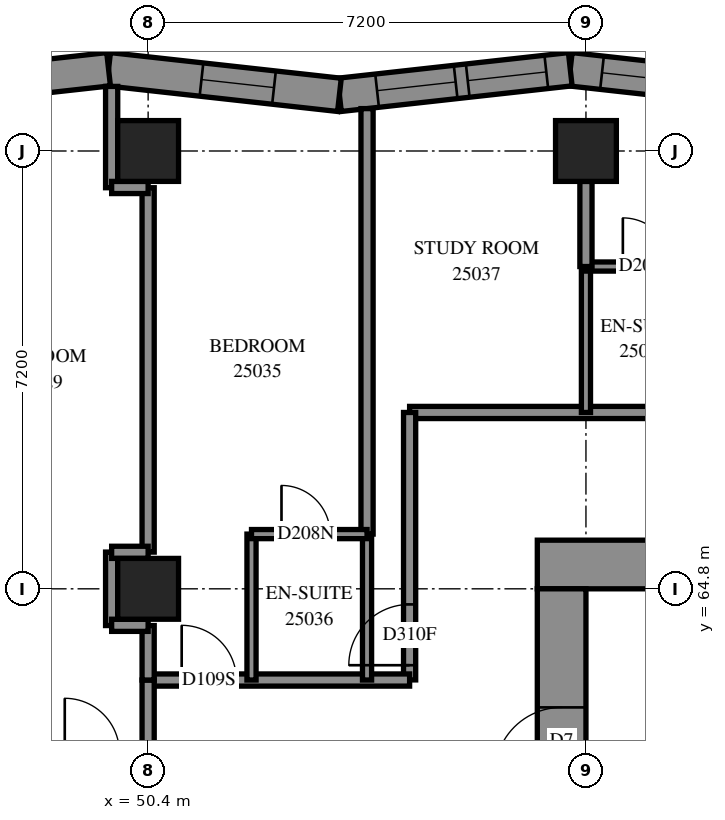
"""IFC4 building model, lengths in metres.
Left out: names, types, materials, properties, quantities, classifications, styles, units other than length and angle.
Written with IfcOpenShell. Run it as: python <this file> out.ifc"""

import sys

from ifc_helpers import new_model, si_unit, direction, frame, frame_2d, origin, origin_2d, place, context, subcontext, project, spatial, polyline, rectangle, outline, extrude, element, fill, save


model = new_model("IFC4")
c1 = context("Model", 3, precision=1e-05, world=origin(), true_north=direction((0.0, 1.0)))
c2 = subcontext(c1, "Body", "Model", "MODEL_VIEW")
j1 = project(units=[si_unit("LENGTHUNIT", "METRE"), si_unit("PLANEANGLEUNIT", "RADIAN")], contexts=[c1])
p1 = place(None, origin())
s1 = spatial("IfcSite", under=j1, at=p1, CompositionType="ELEMENT")
p2 = place(p1, origin())
s2 = spatial("IfcBuilding", under=s1, at=p2, CompositionType="ELEMENT")
p3 = place(p2, frame((0.0, 0.0, 94.8)))
s3 = spatial("IfcBuildingStorey", under=s2, at=p3, CompositionType="ELEMENT", Elevation=94.8)
for number, where, z_axis, x_axis in (
    (1, (50.4, 64.8, 0.0), (0.0, 0.0, 1.0), (1.0, 0.0, 0.0)),
    (2, (50.4, 72.0, 0.0), (0.0, 0.0, 1.0), (1.0, 0.0, 0.0)),
    (3, (57.6, 72.0, 0.0), (0.0, 0.0, 1.0), (1.0, 0.0, 0.0)),
):
    element("IfcColumn", number, at=place(p3, frame(where, z_axis=z_axis, x_axis=x_axis)), inside=s3, PredefinedType="COLUMN", context=c2, shape_type="SweptSolid", body=[
        extrude(rectangle(XDim=1.0, YDim=1.0, at=origin_2d()), origin(), (0.0, 0.0, 1.0), 3.1),
    ])
p4 = place(p3, frame((56.8, 65.2, -0.3), z_axis=(0.0, 0.0, 1.0), x_axis=(1.0, 0.0, 0.0)))
e4 = element("IfcWall", 4, at=p4, inside=s3, PredefinedType="SHEAR", context=c2, shape_type="SweptSolid", body=[
    extrude(rectangle(XDim=16.0, YDim=0.8, at=frame_2d((8.0, 0.0))), origin(), (0.0, 0.0, 1.0), 2.7),
])
p5 = place(p4, frame((10.8, 0.0, 0.3)))
e5 = element("IfcOpeningElement", 5, at=p5, cuts=e4, PredefinedType="OPENING", context=c2, shape_type="SweptSolid", body=[
    extrude(rectangle(XDim=0.8, YDim=2.1, at=frame_2d((0.4, 1.05))), frame((0.0, 0.41, 0.0), z_axis=(0.0, -1.0, 0.0), x_axis=(1.0, 0.0, 0.0)), (0.0, 0.0, 1.0), 0.82),
])
p6 = place(p3, frame((57.2, 50.4, -0.3), z_axis=(0.0, 0.0, 1.0), x_axis=(0.0, 1.0, 0.0)))
e6 = element("IfcWall", 6, at=p6, inside=s3, PredefinedType="SHEAR", context=c2, shape_type="SweptSolid", body=[
    extrude(rectangle(XDim=14.4, YDim=0.8, at=frame_2d((7.2, 0.0))), origin(), (0.0, 0.0, 1.0), 2.7),
])
p7 = place(p6, frame((4.55, 0.0, 0.3)))
e7 = element("IfcOpeningElement", 7, at=p7, cuts=e6, PredefinedType="OPENING", context=c2, shape_type="SweptSolid", body=[
    extrude(rectangle(XDim=1.1, YDim=2.1, at=frame_2d((0.55, 1.05))), frame((0.0, 0.41, 0.0), z_axis=(0.0, -1.0, 0.0), x_axis=(1.0, 0.0, 0.0)), (0.0, 0.0, 1.0), 0.82),
])
p8 = place(p6, frame((11.35, 0.0, 0.3)))
e8 = element("IfcOpeningElement", 8, at=p8, cuts=e6, PredefinedType="OPENING", context=c2, shape_type="SweptSolid", body=[
    extrude(rectangle(XDim=1.1, YDim=2.1, at=frame_2d((0.55, 1.05))), frame((0.0, 0.41, 0.0), z_axis=(0.0, -1.0, 0.0), x_axis=(1.0, 0.0, 0.0)), (0.0, 0.0, 1.0), 0.82),
])
p9 = place(p3, frame((61.138, 72.923, 0.0), z_axis=(0.0, 0.0, 1.0), x_axis=(-0.99390702, 0.1102217568, 0.0)))
e9 = element("IfcWall", 9, at=p9, inside=s3, PredefinedType="SOLIDWALL", context=c2, shape_type="SweptSolid", body=[
    extrude(outline(polyline([(0.03, -0.275), (3.85, -0.275), (3.789, 0.275), (-0.03, 0.275), (0.03, -0.275)])), origin(), (0.0, 0.0, 1.0), 3.1),
])
p10 = place(p9, frame((0.494, 0.0, 0.5)))
e10 = element("IfcOpeningElement", 10, at=p10, cuts=e9, PredefinedType="OPENING", context=c2, shape_type="SweptSolid", body=[
    extrude(rectangle(XDim=1.3, YDim=2.45, at=frame_2d((0.65, 1.225))), frame((0.0, 0.285, 0.0), z_axis=(0.0, -1.0, 0.0), x_axis=(1.0, 0.0, 0.0)), (0.0, 0.0, 1.0), 0.57),
])
p11 = place(p9, frame((1.994, 0.0, 0.5)))
e11 = element("IfcOpeningElement", 11, at=p11, cuts=e9, PredefinedType="OPENING", context=c2, shape_type="SweptSolid", body=[
    extrude(rectangle(XDim=1.3, YDim=2.45, at=frame_2d((0.65, 1.225))), frame((0.0, 0.285, 0.0), z_axis=(0.0, -1.0, 0.0), x_axis=(1.0, 0.0, 0.0)), (0.0, 0.0, 1.0), 0.57),
])
p12 = place(p3, frame((57.342, 73.344, 0.0), z_axis=(0.0, 0.0, 1.0), x_axis=(-0.99390702, -0.1102217568, 0.0)))
e12 = element("IfcWall", 12, at=p12, inside=s3, PredefinedType="SOLIDWALL", context=c2, shape_type="SweptSolid", body=[
    extrude(outline(polyline([(-0.03, -0.275), (3.789, -0.275), (3.85, 0.275), (0.03, 0.275), (-0.03, -0.275)])), origin(), (0.0, 0.0, 1.0), 3.1),
])
p13 = place(p12, frame((0.397, 0.0, 0.5)))
e13 = element("IfcOpeningElement", 13, at=p13, cuts=e12, PredefinedType="OPENING", context=c2, shape_type="SweptSolid", body=[
    extrude(rectangle(XDim=1.3, YDim=2.45, at=frame_2d((0.65, 1.225))), frame((0.0, 0.285, 0.0), z_axis=(0.0, -1.0, 0.0), x_axis=(1.0, 0.0, 0.0)), (0.0, 0.0, 1.0), 0.57),
])
p14 = place(p12, frame((1.897, 0.0, 0.5)))
e14 = element("IfcOpeningElement", 14, at=p14, cuts=e12, PredefinedType="OPENING", context=c2, shape_type="SweptSolid", body=[
    extrude(rectangle(XDim=1.3, YDim=2.45, at=frame_2d((0.65, 1.225))), frame((0.0, 0.285, 0.0), z_axis=(0.0, -1.0, 0.0), x_axis=(1.0, 0.0, 0.0)), (0.0, 0.0, 1.0), 0.57),
])
p15 = place(p3, frame((53.546, 72.923, 0.0), z_axis=(0.0, 0.0, 1.0), x_axis=(-0.99390702, 0.1102217568, 0.0)))
e15 = element("IfcWall", 15, at=p15, inside=s3, PredefinedType="SOLIDWALL", context=c2, shape_type="SweptSolid", body=[
    extrude(outline(polyline([(0.03, -0.275), (3.85, -0.275), (3.789, 0.275), (-0.03, 0.275), (0.03, -0.275)])), origin(), (0.0, 0.0, 1.0), 3.1),
])
p16 = place(p15, frame((1.083, 0.0, 0.5)))
e16 = element("IfcOpeningElement", 16, at=p16, cuts=e15, PredefinedType="OPENING", context=c2, shape_type="SweptSolid", body=[
    extrude(rectangle(XDim=1.2, YDim=2.45, at=frame_2d((0.6, 1.225))), frame((0.0, 0.285, 0.0), z_axis=(0.0, -1.0, 0.0), x_axis=(1.0, 0.0, 0.0)), (0.0, 0.0, 1.0), 0.57),
])
p17 = place(p3, frame((49.749, 73.344, 0.0), z_axis=(0.0, 0.0, 1.0), x_axis=(-0.99390702, -0.1102217568, 0.0)))
e17 = element("IfcWall", 17, at=p17, inside=s3, PredefinedType="SOLIDWALL", context=c2, shape_type="SweptSolid", body=[
    extrude(outline(polyline([(-0.03, -0.275), (3.789, -0.275), (3.85, 0.275), (0.03, 0.275), (-0.03, -0.275)])), origin(), (0.0, 0.0, 1.0), 3.1),
])
p18 = place(p17, frame((0.999, 0.0, 0.5)))
e18 = element("IfcOpeningElement", 18, at=p18, cuts=e17, PredefinedType="OPENING", context=c2, shape_type="SweptSolid", body=[
    extrude(rectangle(XDim=1.2, YDim=2.45, at=frame_2d((0.6, 1.225))), frame((0.0, 0.285, 0.0), z_axis=(0.0, -1.0, 0.0), x_axis=(1.0, 0.0, 0.0)), (0.0, 0.0, 1.0), 0.57),
])
p19 = place(p3, frame((54.7, 67.7, 0.0), z_axis=(0.0, 0.0, 1.0), x_axis=(1.0, 0.0, 0.0)))
e19 = element("IfcWall", 19, at=p19, inside=s3, PredefinedType="PARTITIONING", context=c2, shape_type="SweptSolid", body=[
    extrude(rectangle(XDim=20.2, YDim=0.2, at=frame_2d((10.1, 0.0))), origin(), (0.0, 0.0, 1.0), 3.1),
])
p20 = place(p19, frame((5.25, 0.0, 0.0)))
e20 = element("IfcOpeningElement", 20, at=p20, cuts=e19, PredefinedType="OPENING", context=c2, shape_type="SweptSolid", body=[
    extrude(rectangle(XDim=0.9, YDim=2.1, at=frame_2d((0.45, 1.05))), frame((0.0, 0.11, 0.0), z_axis=(0.0, -1.0, 0.0), x_axis=(1.0, 0.0, 0.0)), (0.0, 0.0, 1.0), 0.22),
])
p21 = place(p19, frame((6.9, 0.0, 0.0)))
e21 = element("IfcOpeningElement", 21, at=p21, cuts=e19, PredefinedType="OPENING", context=c2, shape_type="SweptSolid", body=[
    extrude(rectangle(XDim=0.9, YDim=2.1, at=frame_2d((0.45, 1.05))), frame((0.0, 0.11, 0.0), z_axis=(0.0, -1.0, 0.0), x_axis=(1.0, 0.0, 0.0)), (0.0, 0.0, 1.0), 0.22),
])
p22 = place(p19, frame((12.45, 0.0, 0.0)))
e22 = element("IfcOpeningElement", 22, at=p22, cuts=e19, PredefinedType="OPENING", context=c2, shape_type="SweptSolid", body=[
    extrude(rectangle(XDim=0.9, YDim=2.1, at=frame_2d((0.45, 1.05))), frame((0.0, 0.11, 0.0), z_axis=(0.0, -1.0, 0.0), x_axis=(1.0, 0.0, 0.0)), (0.0, 0.0, 1.0), 0.22),
])
p23 = place(p19, frame((14.1, 0.0, 0.0)))
e23 = element("IfcOpeningElement", 23, at=p23, cuts=e19, PredefinedType="OPENING", context=c2, shape_type="SweptSolid", body=[
    extrude(rectangle(XDim=0.9, YDim=2.1, at=frame_2d((0.45, 1.05))), frame((0.0, 0.11, 0.0), z_axis=(0.0, -1.0, 0.0), x_axis=(1.0, 0.0, 0.0)), (0.0, 0.0, 1.0), 0.22),
])
p24 = place(p3, frame((54.0, 65.7, 0.0), z_axis=(0.0, 0.0, 1.0), x_axis=(0.0, 1.0, 0.0)))
e24 = element("IfcWall", 24, at=p24, inside=s3, PredefinedType="PARTITIONING", context=c2, shape_type="SweptSolid", body=[
    extrude(rectangle(XDim=6.997, YDim=0.2, at=frame_2d((3.498, 0.0))), origin(), (0.0, 0.0, 1.0), 3.1),
])
p25 = place(p3, frame((50.4, 65.404, 0.0), z_axis=(0.0, 0.0, 1.0), x_axis=(0.0, 1.0, 0.0)))
e25 = element("IfcWall", 25, at=p25, inside=s3, PredefinedType="PARTITIONING", context=c2, shape_type="SweptSolid", body=[
    extrude(rectangle(XDim=5.992, YDim=0.2, at=frame_2d((2.996, 0.0))), origin(), (0.0, 0.0, 1.0), 3.1),
])
p26 = place(p3, frame((54.7, 63.302, 0.0), z_axis=(0.0, 0.0, 1.0), x_axis=(0.0, 1.0, 0.0)))
e26 = element("IfcWall", 26, at=p26, inside=s3, PredefinedType="PARTITIONING", context=c2, shape_type="SweptSolid", body=[
    extrude(rectangle(XDim=4.398, YDim=0.2, at=frame_2d((2.199, 0.0))), origin(), (0.0, 0.0, 1.0), 3.1),
])
p27 = place(p26, frame((0.242, 0.0, 0.0)))
e27 = element("IfcOpeningElement", 27, at=p27, cuts=e26, PredefinedType="OPENING", context=c2, shape_type="SweptSolid", body=[
    extrude(rectangle(XDim=1.0, YDim=2.1, at=frame_2d((0.5, 1.05))), frame((0.0, 0.11, 0.0), z_axis=(0.0, -1.0, 0.0), x_axis=(1.0, 0.0, 0.0)), (0.0, 0.0, 1.0), 0.22),
])
p28 = place(p3, frame((50.4, 63.3, 0.0), z_axis=(0.0, 0.0, 1.0), x_axis=(1.0, 0.0, 0.0)))
e28 = element("IfcWall", 28, at=p28, inside=s3, PredefinedType="PARTITIONING", context=c2, shape_type="SweptSolid", body=[
    extrude(rectangle(XDim=4.3, YDim=0.2, at=frame_2d((2.15, 0.0))), origin(), (0.0, 0.0, 1.0), 3.1),
])
p29 = place(p28, frame((0.552, 0.0, 0.0)))
e29 = element("IfcOpeningElement", 29, at=p29, cuts=e28, PredefinedType="OPENING", context=c2, shape_type="SweptSolid", body=[
    extrude(rectangle(XDim=0.9, YDim=2.1, at=frame_2d((0.45, 1.05))), frame((0.0, 0.11, 0.0), z_axis=(0.0, -1.0, 0.0), x_axis=(1.0, 0.0, 0.0)), (0.0, 0.0, 1.0), 0.22),
])
for number, where, z_axis, x_axis in (
    (30, (52.1, 63.3, 0.0), (0.0, 0.0, 1.0), (0.0, 1.0, 0.0)),
    (31, (54.0, 63.3, 0.0), (0.0, 0.0, 1.0), (0.0, 1.0, 0.0)),
    (32, (57.6, 67.7, 0.0), (0.0, 0.0, 1.0), (0.0, 1.0, 0.0)),
):
    element("IfcWall", number, at=place(p3, frame(where, z_axis=z_axis, x_axis=x_axis)), inside=s3, PredefinedType="PARTITIONING", context=c2, shape_type="SweptSolid", body=[
        extrude(rectangle(XDim=2.4, YDim=0.15, at=frame_2d((1.2, 0.0))), origin(), (0.0, 0.0, 1.0), 3.1),
    ])
p30 = place(p3, frame((52.1, 65.7, 0.0), z_axis=(0.0, 0.0, 1.0), x_axis=(1.0, 0.0, 0.0)))
e33 = element("IfcWall", 33, at=p30, inside=s3, PredefinedType="PARTITIONING", context=c2, shape_type="SweptSolid", body=[
    extrude(rectangle(XDim=1.9, YDim=0.15, at=frame_2d((0.95, 0.0))), origin(), (0.0, 0.0, 1.0), 3.1),
])
p31 = place(p30, frame((0.493, 0.0, 0.0)))
e34 = element("IfcOpeningElement", 34, at=p31, cuts=e33, PredefinedType="OPENING", context=c2, shape_type="SweptSolid", body=[
    extrude(rectangle(XDim=0.8, YDim=2.1, at=frame_2d((0.4, 1.05))), frame((0.0, 0.085, 0.0), z_axis=(0.0, -1.0, 0.0), x_axis=(1.0, 0.0, 0.0)), (0.0, 0.0, 1.0), 0.17),
])
p32 = place(p3, frame((57.6, 70.1, 0.0), z_axis=(0.0, 0.0, 1.0), x_axis=(1.0, 0.0, 0.0)))
e35 = element("IfcWall", 35, at=p32, inside=s3, PredefinedType="PARTITIONING", context=c2, shape_type="SweptSolid", body=[
    extrude(rectangle(XDim=1.9, YDim=0.15, at=frame_2d((0.95, 0.0))), origin(), (0.0, 0.0, 1.0), 3.1),
])
p33 = place(p32, frame((0.607, 0.0, 0.0)))
e36 = element("IfcOpeningElement", 36, at=p33, cuts=e35, PredefinedType="OPENING", context=c2, shape_type="SweptSolid", body=[
    extrude(rectangle(XDim=0.8, YDim=2.1, at=frame_2d((0.4, 1.05))), frame((0.0, 0.085, 0.0), z_axis=(0.0, -1.0, 0.0), x_axis=(1.0, 0.0, 0.0)), (0.0, 0.0, 1.0), 0.17),
])
p34 = place(p3, frame((49.8, 71.396, 0.0), z_axis=(0.0, 0.0, 1.0), x_axis=(0.0, 1.0, 0.0)))
e37 = element("IfcWall", 37, at=p34, inside=s3, PredefinedType="PARTITIONING", context=c2, shape_type="SweptSolid", body=[
    extrude(rectangle(XDim=1.666, YDim=0.2, at=frame_2d((0.833, 0.0))), origin(), (0.0, 0.0, 1.0), 3.1),
])
p35 = place(p3, frame((57.6, 70.1, 0.0), z_axis=(0.0, 0.0, 1.0), x_axis=(0.0, 1.0, 0.0)))
e38 = element("IfcWall", 38, at=p35, inside=s3, PredefinedType="PARTITIONING", context=c2, shape_type="SweptSolid", body=[
    extrude(rectangle(XDim=1.4, YDim=0.2, at=frame_2d((0.7, 0.0))), origin(), (0.0, 0.0, 1.0), 3.1),
])
p36 = place(p3, frame((49.8, 64.196, 0.0), z_axis=(0.0, 0.0, 1.0), x_axis=(0.0, 1.0, 0.0)))
e39 = element("IfcWall", 39, at=p36, inside=s3, PredefinedType="PARTITIONING", context=c2, shape_type="SweptSolid", body=[
    extrude(rectangle(XDim=1.208, YDim=0.2, at=frame_2d((0.604, 0.0))), origin(), (0.0, 0.0, 1.0), 3.1),
])
p37 = place(p3, frame((50.4, 62.102, 0.0), z_axis=(0.0, 0.0, 1.0), x_axis=(0.0, 1.0, 0.0)))
e40 = element("IfcWall", 40, at=p37, inside=s3, PredefinedType="PARTITIONING", context=c2, shape_type="SweptSolid", body=[
    extrude(rectangle(XDim=1.198, YDim=0.2, at=frame_2d((0.599, 0.0))), origin(), (0.0, 0.0, 1.0), 3.1),
])
p38 = place(p3, frame((50.4, 63.3, 0.0), z_axis=(0.0, 0.0, 1.0), x_axis=(0.0, 1.0, 0.0)))
e41 = element("IfcWall", 41, at=p38, inside=s3, PredefinedType="PARTITIONING", context=c2, shape_type="SweptSolid", body=[
    extrude(rectangle(XDim=0.896, YDim=0.2, at=frame_2d((0.448, 0.0))), origin(), (0.0, 0.0, 1.0), 3.1),
])
for number, where, z_axis, x_axis in (
    (42, (49.8, 71.4, 0.0), (0.0, 0.0, 1.0), (1.0, 0.0, 0.0)),
    (43, (49.8, 65.4, 0.0), (0.0, 0.0, 1.0), (1.0, 0.0, 0.0)),
    (44, (49.8, 64.2, 0.0), (0.0, 0.0, 1.0), (1.0, 0.0, 0.0)),
):
    element("IfcWall", number, at=place(p3, frame(where, z_axis=z_axis, x_axis=x_axis)), inside=s3, PredefinedType="PARTITIONING", context=c2, shape_type="SweptSolid", body=[
        extrude(rectangle(XDim=0.6, YDim=0.2, at=frame_2d((0.3, 0.0))), origin(), (0.0, 0.0, 1.0), 3.1),
    ])
p39 = place(p11, origin())
e45 = element("IfcWindow", 45, at=p39, inside=s3, PartitioningType="SINGLE_PANEL", PredefinedType="WINDOW", context=c2, shape_type="SweptSolid", body=[
    extrude(rectangle(XDim=1.3, YDim=2.45, at=frame_2d((0.65, 1.225))), frame((0.0, 0.155, 0.0), z_axis=(0.0, -1.0, 0.0), x_axis=(1.0, 0.0, 0.0)), (0.0, 0.0, 1.0), 0.06),
])
fill(e11, e45)
p40 = place(p13, origin())
e46 = element("IfcWindow", 46, at=p40, inside=s3, PartitioningType="SINGLE_PANEL", PredefinedType="WINDOW", context=c2, shape_type="SweptSolid", body=[
    extrude(rectangle(XDim=1.3, YDim=2.45, at=frame_2d((0.65, 1.225))), frame((0.0, 0.155, 0.0), z_axis=(0.0, -1.0, 0.0), x_axis=(1.0, 0.0, 0.0)), (0.0, 0.0, 1.0), 0.06),
])
fill(e13, e46)
p41 = place(p14, origin())
e47 = element("IfcWindow", 47, at=p41, inside=s3, PartitioningType="SINGLE_PANEL", PredefinedType="WINDOW", context=c2, shape_type="SweptSolid", body=[
    extrude(rectangle(XDim=1.3, YDim=2.45, at=frame_2d((0.65, 1.225))), frame((0.0, 0.155, 0.0), z_axis=(0.0, -1.0, 0.0), x_axis=(1.0, 0.0, 0.0)), (0.0, 0.0, 1.0), 0.06),
])
fill(e14, e47)
p42 = place(p16, origin())
e48 = element("IfcWindow", 48, at=p42, inside=s3, PartitioningType="SINGLE_PANEL", PredefinedType="WINDOW", context=c2, shape_type="SweptSolid", body=[
    extrude(rectangle(XDim=1.2, YDim=2.45, at=frame_2d((0.6, 1.225))), frame((0.0, 0.155, 0.0), z_axis=(0.0, -1.0, 0.0), x_axis=(1.0, 0.0, 0.0)), (0.0, 0.0, 1.0), 0.06),
])
fill(e16, e48)
p43 = place(p8, origin())
e49 = element("IfcDoor", 49, at=p43, inside=s3, OperationType="SINGLE_SWING_LEFT", PredefinedType="DOOR", context=c2, shape_type="SweptSolid", body=[
    extrude(rectangle(XDim=1.1, YDim=2.1, at=frame_2d((0.55, 1.05))), frame((0.0, 0.025, 0.0), z_axis=(0.0, -1.0, 0.0), x_axis=(1.0, 0.0, 0.0)), (0.0, 0.0, 1.0), 0.05),
])
fill(e8, e49)
p44 = place(p29, origin())
e50 = element("IfcDoor", 50, at=p44, inside=s3, OperationType="SINGLE_SWING_RIGHT", PredefinedType="DOOR", context=c2, shape_type="SweptSolid", body=[
    extrude(rectangle(XDim=0.9, YDim=2.1, at=frame_2d((0.45, 1.05))), frame((0.0, 0.025, 0.0), z_axis=(0.0, -1.0, 0.0), x_axis=(1.0, 0.0, 0.0)), (0.0, 0.0, 1.0), 0.05),
])
fill(e29, e50)
p45 = place(p31, origin())
e51 = element("IfcDoor", 51, at=p45, inside=s3, OperationType="SINGLE_SWING_RIGHT", PredefinedType="DOOR", context=c2, shape_type="SweptSolid", body=[
    extrude(rectangle(XDim=0.8, YDim=2.1, at=frame_2d((0.4, 1.05))), frame((0.0, 0.025, 0.0), z_axis=(0.0, -1.0, 0.0), x_axis=(1.0, 0.0, 0.0)), (0.0, 0.0, 1.0), 0.05),
])
fill(e34, e51)
p46 = place(p27, origin())
e52 = element("IfcDoor", 52, at=p46, inside=s3, OperationType="SINGLE_SWING_LEFT", PredefinedType="DOOR", context=c2, shape_type="SweptSolid", body=[
    extrude(rectangle(XDim=1.0, YDim=2.1, at=frame_2d((0.5, 1.05))), frame((0.0, 0.025, 0.0), z_axis=(0.0, -1.0, 0.0), x_axis=(1.0, 0.0, 0.0)), (0.0, 0.0, 1.0), 0.05),
])
fill(e27, e52)
p47 = place(p33, origin())
e53 = element("IfcDoor", 53, at=p47, inside=s3, OperationType="SINGLE_SWING_RIGHT", PredefinedType="DOOR", context=c2, shape_type="SweptSolid", body=[
    extrude(rectangle(XDim=0.8, YDim=2.1, at=frame_2d((0.4, 1.05))), frame((0.0, 0.025, 0.0), z_axis=(0.0, -1.0, 0.0), x_axis=(1.0, 0.0, 0.0)), (0.0, 0.0, 1.0), 0.05),
])
fill(e36, e53)
save(model, sys.argv[1])
